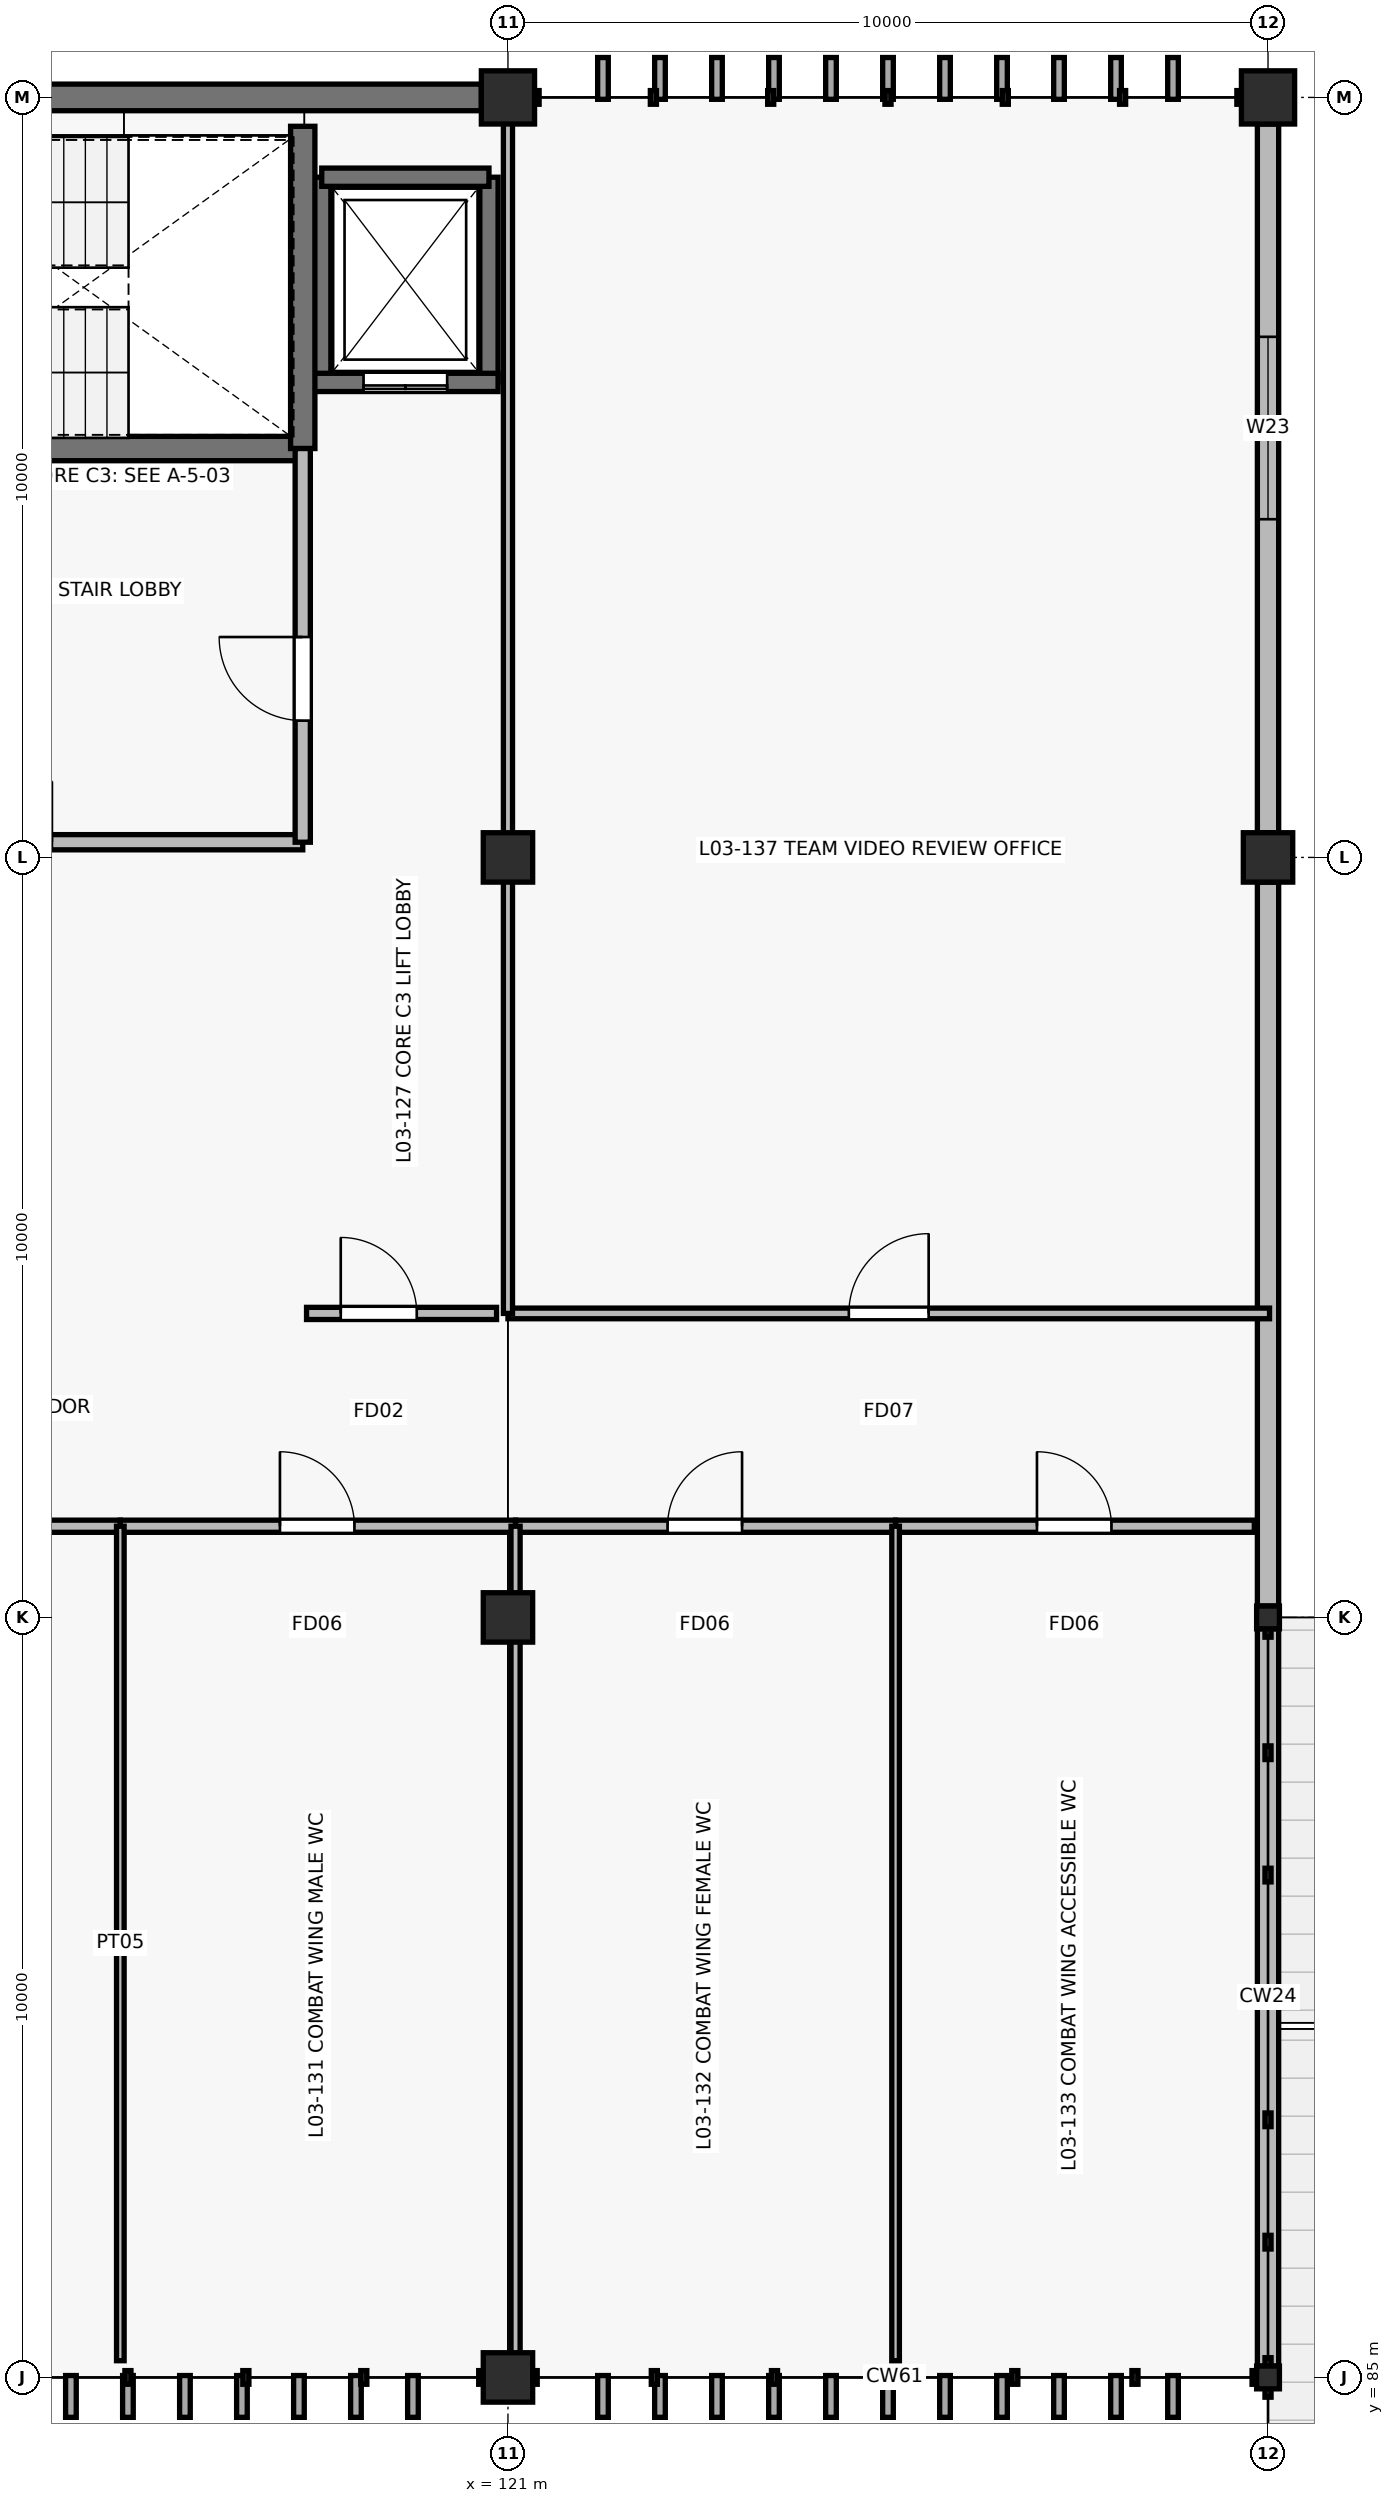
"""IFC4 building model, lengths in metres.
Left out: names, types, materials, properties, quantities, classifications, styles, units other than length and angle.
Written with IfcOpenShell. Run it as: python <this file> out.ifc"""

import sys

from ifc_helpers import new_model, si_unit, direction, frame, frame_2d, origin, origin_2d, place, context, subcontext, project, spatial, rectangle, circle, i_section, extrude, element, fill, save


model = new_model("IFC4")
c1 = context("Model", 3, precision=1e-05, world=origin(), true_north=direction((0.0, 1.0)))
c2 = subcontext(c1, "Body", "Model", "MODEL_VIEW")
j1 = project(units=[si_unit("LENGTHUNIT", "METRE"), si_unit("PLANEANGLEUNIT", "RADIAN")], contexts=[c1])
p1 = place(None, origin())
s1 = spatial("IfcSite", under=j1, at=p1, CompositionType="ELEMENT")
p2 = place(p1, origin())
s2 = spatial("IfcBuilding", under=s1, at=p2, CompositionType="ELEMENT")
p3 = place(p2, frame((0.0, 0.0, 13.2)))
s3 = spatial("IfcBuildingStorey", under=s2, at=p3, CompositionType="ELEMENT", Elevation=13.2)
for number, where, z_axis, x_axis in (
    (1, (131.0, 85.0, 0.0), (0.0, 0.0, 1.0), (1.0, 0.0, 0.0)),
    (2, (131.0, 95.0, 0.0), (0.0, 0.0, 1.0), (1.0, 0.0, 0.0)),
):
    element("IfcColumn", number, at=place(p3, frame(where, z_axis=z_axis, x_axis=x_axis)), inside=s3, PredefinedType="COLUMN", context=c2, shape_type="SweptSolid", body=[
        extrude(i_section(OverallWidth=0.3, OverallDepth=0.3, WebThickness=0.011, FlangeThickness=0.019, at=origin_2d()), origin(), (0.0, 0.0, 1.0), 4.2),
    ])
for number, where, z_axis, x_axis in (
    (3, (121.0, 85.0, 0.0), (0.0, 0.0, 1.0), (1.0, 0.0, 0.0)),
    (4, (121.0, 95.0, 0.0), (0.0, 0.0, 1.0), (1.0, 0.0, 0.0)),
    (5, (121.0, 105.0, 0.0), (0.0, 0.0, 1.0), (1.0, 0.0, 0.0)),
):
    element("IfcColumn", number, at=place(p3, frame(where, z_axis=z_axis, x_axis=x_axis)), inside=s3, PredefinedType="COLUMN", context=c2, shape_type="SweptSolid", body=[
        extrude(rectangle(XDim=0.65, YDim=0.65, at=origin_2d()), origin(), (0.0, 0.0, 1.0), 4.2),
    ])
p4 = place(p3, frame((121.0, 115.0, 0.0), z_axis=(0.0, 0.0, 1.0), x_axis=(1.0, 0.0, 0.0)))
e6 = element("IfcColumn", 6, at=p4, inside=s3, PredefinedType="COLUMN", context=c2, shape_type="SweptSolid", body=[
    extrude(circle(Radius=0.35, at=origin_2d()), origin(), (0.0, 0.0, 1.0), 4.2),
])
p5 = place(p3, frame((131.0, 105.0, 0.0), z_axis=(0.0, 0.0, 1.0), x_axis=(1.0, 0.0, 0.0)))
e7 = element("IfcColumn", 7, at=p5, inside=s3, PredefinedType="COLUMN", context=c2, shape_type="SweptSolid", body=[
    extrude(rectangle(XDim=0.65, YDim=0.65, at=origin_2d()), origin(), (0.0, 0.0, 1.0), 4.2),
])
p6 = place(p3, frame((131.0, 115.0, 0.0), z_axis=(0.0, 0.0, 1.0), x_axis=(1.0, 0.0, 0.0)))
e8 = element("IfcColumn", 8, at=p6, inside=s3, PredefinedType="COLUMN", context=c2, shape_type="SweptSolid", body=[
    extrude(circle(Radius=0.35, at=origin_2d()), origin(), (0.0, 0.0, 1.0), 4.2),
])
p7 = place(p3, frame((111.35, 115.0, 0.0), z_axis=(0.0, 0.0, 1.0), x_axis=(1.0, 0.0, 0.0)))
e9 = element("IfcWall", 9, at=p7, inside=s3, PredefinedType="SOLIDWALL", context=c2, shape_type="SweptSolid", body=[
    extrude(rectangle(XDim=9.3, YDim=0.35, at=frame_2d((4.65, 0.0))), origin(), (0.0, 0.0, 1.0), 4.2),
])
p8 = place(p7, frame((2.2, 0.0, 1.0)))
e10 = element("IfcOpeningElement", 10, at=p8, cuts=e9, PredefinedType="OPENING", context=c2, shape_type="SweptSolid", body=[
    extrude(rectangle(XDim=1.2, YDim=1.8, at=frame_2d((0.6, 0.9))), frame((0.0, 0.185, 0.0), z_axis=(0.0, -1.0, 0.0), x_axis=(1.0, 0.0, 0.0)), (0.0, 0.0, 1.0), 0.37),
])
p9 = place(p3, frame((131.0, 94.85, 0.0), z_axis=(0.0, 0.0, 1.0), x_axis=(0.0, -1.0, 0.0)))
e11 = element("IfcWall", 11, at=p9, inside=s3, PredefinedType="SOLIDWALL", context=c2, shape_type="SweptSolid", body=[
    extrude(rectangle(XDim=9.7, YDim=0.28, at=frame_2d((4.85, 0.0))), origin(), (0.0, 0.0, 1.0), 0.475),
])
p10 = place(p3, frame((131.0, 104.675, 0.0), z_axis=(0.0, 0.0, 1.0), x_axis=(0.0, -1.0, 0.0)))
e12 = element("IfcWall", 12, at=p10, inside=s3, PredefinedType="SOLIDWALL", context=c2, shape_type="SweptSolid", body=[
    extrude(rectangle(XDim=9.525, YDim=0.28, at=frame_2d((4.763, 0.0))), origin(), (0.0, 0.0, 1.0), 0.475),
])
p11 = place(p3, frame((131.0, 114.65, 0.0), z_axis=(0.0, 0.0, 1.0), x_axis=(0.0, -1.0, 0.0)))
e13 = element("IfcWall", 13, at=p11, inside=s3, PredefinedType="SOLIDWALL", context=c2, shape_type="SweptSolid", body=[
    extrude(rectangle(XDim=9.325, YDim=0.28, at=frame_2d((4.663, 0.0))), origin(), (0.0, 0.0, 1.0), 3.005),
])
p12 = place(p11, frame((2.8, 0.0, 0.9)))
e14 = element("IfcOpeningElement", 14, at=p12, cuts=e13, PredefinedType="OPENING", context=c2, shape_type="SweptSolid", body=[
    extrude(rectangle(XDim=2.4, YDim=1.1, at=frame_2d((1.2, 0.55))), frame((0.0, 0.15, 0.0), z_axis=(0.0, -1.0, 0.0), x_axis=(1.0, 0.0, 0.0)), (0.0, 0.0, 1.0), 0.3),
])
for number, where, z_axis, x_axis in (
    (15, (118.55, 111.25, 0.0), (0.0, 0.0, 1.0), (0.0, 1.0, 0.0)),
    (16, (120.75, 113.95, 0.0), (0.0, 0.0, 1.0), (0.0, -1.0, 0.0)),
):
    element("IfcWall", number, at=place(p3, frame(where, z_axis=z_axis, x_axis=x_axis)), inside=s3, PredefinedType="SHEAR", context=c2, shape_type="SweptSolid", body=[
        extrude(rectangle(XDim=2.7, YDim=0.24, at=frame_2d((1.35, 0.0))), origin(), (0.0, 0.0, 1.0), 4.2),
    ])
p13 = place(p3, frame((118.55, 113.95, 0.0), z_axis=(0.0, 0.0, 1.0), x_axis=(1.0, 0.0, 0.0)))
e17 = element("IfcWall", 17, at=p13, inside=s3, PredefinedType="SHEAR", context=c2, shape_type="SweptSolid", body=[
    extrude(rectangle(XDim=2.2, YDim=0.24, at=frame_2d((1.1, 0.0))), origin(), (0.0, 0.0, 1.0), 4.2),
])
p14 = place(p3, frame((120.87, 111.25, 0.0), z_axis=(0.0, 0.0, 1.0), x_axis=(-1.0, 0.0, 0.0)))
e18 = element("IfcWall", 18, at=p14, inside=s3, PredefinedType="SHEAR", context=c2, shape_type="SweptSolid", body=[
    extrude(rectangle(XDim=2.44, YDim=0.24, at=frame_2d((1.22, 0.0))), origin(), (0.0, 0.0, 1.0), 4.2),
])
p15 = place(p14, frame((0.67, 0.0, 0.0)))
e19 = element("IfcOpeningElement", 19, at=p15, cuts=e18, PredefinedType="OPENING", context=c2, shape_type="SweptSolid", body=[
    extrude(rectangle(XDim=1.1, YDim=2.15, at=frame_2d((0.55, 1.075))), frame((0.0, 0.13, 0.0), z_axis=(0.0, -1.0, 0.0), x_axis=(1.0, 0.0, 0.0)), (0.0, 0.0, 1.0), 0.26),
])
p16 = place(p3, frame((111.2, 110.38, 0.0), z_axis=(0.0, 0.0, 1.0), x_axis=(1.0, 0.0, 0.0)))
e20 = element("IfcWall", 20, at=p16, inside=s3, PredefinedType="SHEAR", context=c2, shape_type="SweptSolid", body=[
    extrude(rectangle(XDim=7.1, YDim=0.32, at=frame_2d((3.55, 0.0))), origin(), (0.0, 0.0, 1.0), 4.2),
])
p17 = place(p16, frame((0.3, 0.0, 0.0)))
e21 = element("IfcOpeningElement", 21, at=p17, cuts=e20, PredefinedType="OPENING", context=c2, shape_type="SweptSolid", body=[
    extrude(rectangle(XDim=1.0, YDim=2.15, at=frame_2d((0.5, 1.075))), frame((0.0, 0.17, 0.0), z_axis=(0.0, -1.0, 0.0), x_axis=(1.0, 0.0, 0.0)), (0.0, 0.0, 1.0), 0.34),
])
p18 = place(p3, frame((118.3, 110.38, 0.0), z_axis=(0.0, 0.0, 1.0), x_axis=(0.0, 1.0, 0.0)))
e22 = element("IfcWall", 22, at=p18, inside=s3, PredefinedType="SHEAR", context=c2, shape_type="SweptSolid", body=[
    extrude(rectangle(XDim=4.24, YDim=0.32, at=frame_2d((2.12, 0.0))), origin(), (0.0, 0.0, 1.0), 4.2),
])
p19 = place(p3, frame((111.2, 105.2, 0.0), z_axis=(0.0, 0.0, 1.0), x_axis=(1.0, 0.0, 0.0)))
e23 = element("IfcWall", 23, at=p19, inside=s3, PredefinedType="PARTITIONING", context=c2, shape_type="SweptSolid", body=[
    extrude(rectangle(XDim=7.1, YDim=0.2, at=frame_2d((3.55, 0.0))), origin(), (0.0, 0.0, 1.0), 3.005),
])
p20 = place(p19, frame((2.2, 0.0, 0.0)))
e24 = element("IfcOpeningElement", 24, at=p20, cuts=e23, PredefinedType="OPENING", context=c2, shape_type="SweptSolid", body=[
    extrude(rectangle(XDim=1.6, YDim=2.2, at=frame_2d((0.8, 1.1))), frame((0.0, 0.11, 0.0), z_axis=(0.0, -1.0, 0.0), x_axis=(1.0, 0.0, 0.0)), (0.0, 0.0, 1.0), 0.22),
])
p21 = place(p3, frame((118.3, 105.2, 0.0), z_axis=(0.0, 0.0, 1.0), x_axis=(0.0, 1.0, 0.0)))
e25 = element("IfcWall", 25, at=p21, inside=s3, PredefinedType="PARTITIONING", context=c2, shape_type="SweptSolid", body=[
    extrude(rectangle(XDim=5.18, YDim=0.2, at=frame_2d((2.59, 0.0))), origin(), (0.0, 0.0, 1.0), 3.005),
])
p22 = place(p21, frame((1.6, 0.0, 0.0)))
e26 = element("IfcOpeningElement", 26, at=p22, cuts=e25, PredefinedType="OPENING", context=c2, shape_type="SweptSolid", body=[
    extrude(rectangle(XDim=1.1, YDim=2.15, at=frame_2d((0.55, 1.075))), frame((0.0, 0.11, 0.0), z_axis=(0.0, -1.0, 0.0), x_axis=(1.0, 0.0, 0.0)), (0.0, 0.0, 1.0), 0.22),
])
p23 = place(p3, frame((118.35, 99.0, 0.0), z_axis=(0.0, 0.0, 1.0), x_axis=(1.0, 0.0, 0.0)))
e27 = element("IfcWall", 27, at=p23, inside=s3, PredefinedType="PARTITIONING", context=c2, shape_type="SweptSolid", body=[
    extrude(rectangle(XDim=2.5, YDim=0.16, at=frame_2d((1.25, 0.0))), origin(), (0.0, 0.0, 1.0), 3.005),
])
p24 = place(p23, frame((0.45, 0.0, 0.0)))
e28 = element("IfcOpeningElement", 28, at=p24, cuts=e27, PredefinedType="OPENING", context=c2, shape_type="SweptSolid", body=[
    extrude(rectangle(XDim=1.0, YDim=2.15, at=frame_2d((0.5, 1.075))), frame((0.0, 0.09, 0.0), z_axis=(0.0, -1.0, 0.0), x_axis=(1.0, 0.0, 0.0)), (0.0, 0.0, 1.0), 0.18),
])
p25 = place(p3, frame((101.1, 96.2, 0.0), z_axis=(0.0, 0.0, 1.0), x_axis=(1.0, 0.0, 0.0)))
e29 = element("IfcWall", 29, at=p25, inside=s3, PredefinedType="PARTITIONING", context=c2, shape_type="SweptSolid", body=[
    extrude(rectangle(XDim=14.8, YDim=0.16, at=frame_2d((7.4, 0.0))), origin(), (0.0, 0.0, 1.0), 3.005),
])
p26 = place(p25, frame((6.25, 0.0, 0.0)))
e30 = element("IfcOpeningElement", 30, at=p26, cuts=e29, PredefinedType="OPENING", context=c2, shape_type="SweptSolid", body=[
    extrude(rectangle(XDim=1.3, YDim=2.2, at=frame_2d((0.65, 1.1))), frame((0.0, 0.09, 0.0), z_axis=(0.0, -1.0, 0.0), x_axis=(1.0, 0.0, 0.0)), (0.0, 0.0, 1.0), 0.18),
])
p27 = place(p3, frame((115.9, 96.2, 0.0), z_axis=(0.0, 0.0, 1.0), x_axis=(1.0, 0.0, 0.0)))
e31 = element("IfcWall", 31, at=p27, inside=s3, PredefinedType="PARTITIONING", context=c2, shape_type="SweptSolid", body=[
    extrude(rectangle(XDim=5.2, YDim=0.16, at=frame_2d((2.6, 0.0))), origin(), (0.0, 0.0, 1.0), 3.005),
])
p28 = place(p27, frame((2.1, 0.0, 0.0)))
e32 = element("IfcOpeningElement", 32, at=p28, cuts=e31, PredefinedType="OPENING", context=c2, shape_type="SweptSolid", body=[
    extrude(rectangle(XDim=0.98, YDim=2.1, at=frame_2d((0.49, 1.05))), frame((0.0, 0.09, 0.0), z_axis=(0.0, -1.0, 0.0), x_axis=(1.0, 0.0, 0.0)), (0.0, 0.0, 1.0), 0.18),
])
p29 = place(p3, frame((115.9, 85.22, 0.0), z_axis=(0.0, 0.0, 1.0), x_axis=(0.0, 1.0, 0.0)))
e33 = element("IfcWall", 33, at=p29, inside=s3, PredefinedType="PARTITIONING", context=c2, shape_type="SweptSolid", body=[
    extrude(rectangle(XDim=10.98, YDim=0.1, at=frame_2d((5.49, 0.0))), origin(), (0.0, 0.0, 1.0), 3.005),
])
p30 = place(p3, frame((121.1, 96.2, 0.0), z_axis=(0.0, 0.0, 1.0), x_axis=(1.0, 0.0, 0.0)))
e34 = element("IfcWall", 34, at=p30, inside=s3, PredefinedType="PARTITIONING", context=c2, shape_type="SweptSolid", body=[
    extrude(rectangle(XDim=5.0, YDim=0.16, at=frame_2d((2.5, 0.0))), origin(), (0.0, 0.0, 1.0), 3.005),
])
p31 = place(p30, frame((2.0, 0.0, 0.0)))
e35 = element("IfcOpeningElement", 35, at=p31, cuts=e34, PredefinedType="OPENING", context=c2, shape_type="SweptSolid", body=[
    extrude(rectangle(XDim=0.98, YDim=2.1, at=frame_2d((0.49, 1.05))), frame((0.0, 0.09, 0.0), z_axis=(0.0, -1.0, 0.0), x_axis=(1.0, 0.0, 0.0)), (0.0, 0.0, 1.0), 0.18),
])
p32 = place(p3, frame((121.1, 85.22, 0.0), z_axis=(0.0, 0.0, 1.0), x_axis=(0.0, 1.0, 0.0)))
e36 = element("IfcWall", 36, at=p32, inside=s3, PredefinedType="PARTITIONING", context=c2, shape_type="SweptSolid", body=[
    extrude(rectangle(XDim=10.98, YDim=0.12, at=frame_2d((5.49, 0.0))), origin(), (0.0, 0.0, 1.0), 3.005),
])
p33 = place(p3, frame((126.1, 96.2, 0.0), z_axis=(0.0, 0.0, 1.0), x_axis=(1.0, 0.0, 0.0)))
e37 = element("IfcWall", 37, at=p33, inside=s3, PredefinedType="PARTITIONING", context=c2, shape_type="SweptSolid", body=[
    extrude(rectangle(XDim=4.72, YDim=0.16, at=frame_2d((2.36, 0.0))), origin(), (0.0, 0.0, 1.0), 3.005),
])
p34 = place(p33, frame((1.86, 0.0, 0.0)))
e38 = element("IfcOpeningElement", 38, at=p34, cuts=e37, PredefinedType="OPENING", context=c2, shape_type="SweptSolid", body=[
    extrude(rectangle(XDim=0.98, YDim=2.1, at=frame_2d((0.49, 1.05))), frame((0.0, 0.09, 0.0), z_axis=(0.0, -1.0, 0.0), x_axis=(1.0, 0.0, 0.0)), (0.0, 0.0, 1.0), 0.18),
])
p35 = place(p3, frame((126.1, 85.22, 0.0), z_axis=(0.0, 0.0, 1.0), x_axis=(0.0, 1.0, 0.0)))
e39 = element("IfcWall", 39, at=p35, inside=s3, PredefinedType="PARTITIONING", context=c2, shape_type="SweptSolid", body=[
    extrude(rectangle(XDim=10.98, YDim=0.1, at=frame_2d((5.49, 0.0))), origin(), (0.0, 0.0, 1.0), 3.005),
])
p36 = place(p3, frame((121.0, 99.0, 0.0), z_axis=(0.0, 0.0, 1.0), x_axis=(1.0, 0.0, 0.0)))
e40 = element("IfcWall", 40, at=p36, inside=s3, PredefinedType="PARTITIONING", context=c2, shape_type="SweptSolid", body=[
    extrude(rectangle(XDim=10.02, YDim=0.14, at=frame_2d((5.01, 0.0))), origin(), (0.0, 0.0, 1.0), 3.005),
])
p37 = place(p36, frame((4.485, 0.0, 0.0)))
e41 = element("IfcOpeningElement", 41, at=p37, cuts=e40, PredefinedType="OPENING", context=c2, shape_type="SweptSolid", body=[
    extrude(rectangle(XDim=1.05, YDim=2.1, at=frame_2d((0.525, 1.05))), frame((0.0, 0.08, 0.0), z_axis=(0.0, -1.0, 0.0), x_axis=(1.0, 0.0, 0.0)), (0.0, 0.0, 1.0), 0.16),
])
p38 = place(p3, frame((121.0, 99.0, 0.0), z_axis=(0.0, 0.0, 1.0), x_axis=(0.0, 1.0, 0.0)))
e42 = element("IfcWall", 42, at=p38, inside=s3, PredefinedType="PARTITIONING", context=c2, shape_type="SweptSolid", body=[
    extrude(rectangle(XDim=15.75, YDim=0.12, at=frame_2d((7.875, 0.0))), origin(), (0.0, 0.0, 1.0), 3.005),
])
p39 = place(p12, origin())
e43 = element("IfcWindow", 43, at=p39, inside=s3, PartitioningType="DOUBLE_PANEL_VERTICAL", PredefinedType="WINDOW", context=c2, shape_type="SweptSolid", body=[
    extrude(rectangle(XDim=2.4, YDim=1.1, at=frame_2d((1.2, 0.55))), frame((0.0, 0.03, 0.0), z_axis=(0.0, -1.0, 0.0), x_axis=(1.0, 0.0, 0.0)), (0.0, 0.0, 1.0), 0.06),
])
fill(e14, e43)
p40 = place(p15, origin())
e44 = element("IfcDoor", 44, at=p40, inside=s3, OperationType="DOUBLE_DOOR_SLIDING", PredefinedType="USERDEFINED", context=c2, shape_type="SweptSolid", body=[
    extrude(rectangle(XDim=1.1, YDim=2.15, at=frame_2d((0.55, 1.075))), frame((0.0, 0.025, 0.0), z_axis=(0.0, -1.0, 0.0), x_axis=(1.0, 0.0, 0.0)), (0.0, 0.0, 1.0), 0.05),
])
fill(e19, e44)
p41 = place(p22, origin())
e45 = element("IfcDoor", 45, at=p41, inside=s3, OperationType="SINGLE_SWING_RIGHT", PredefinedType="DOOR", context=c2, shape_type="SweptSolid", body=[
    extrude(rectangle(XDim=1.1, YDim=2.15, at=frame_2d((0.55, 1.075))), frame((0.0, 0.025, 0.0), z_axis=(0.0, -1.0, 0.0), x_axis=(1.0, 0.0, 0.0)), (0.0, 0.0, 1.0), 0.05),
])
fill(e26, e45)
p42 = place(p24, origin())
e46 = element("IfcDoor", 46, at=p42, inside=s3, OperationType="SINGLE_SWING_LEFT", PredefinedType="DOOR", context=c2, shape_type="SweptSolid", body=[
    extrude(rectangle(XDim=1.0, YDim=2.15, at=frame_2d((0.5, 1.075))), frame((0.0, 0.025, 0.0), z_axis=(0.0, -1.0, 0.0), x_axis=(1.0, 0.0, 0.0)), (0.0, 0.0, 1.0), 0.05),
])
fill(e28, e46)
p43 = place(p28, origin())
e47 = element("IfcDoor", 47, at=p43, inside=s3, OperationType="SINGLE_SWING_LEFT", PredefinedType="DOOR", context=c2, shape_type="SweptSolid", body=[
    extrude(rectangle(XDim=0.98, YDim=2.1, at=frame_2d((0.49, 1.05))), frame((0.0, 0.025, 0.0), z_axis=(0.0, -1.0, 0.0), x_axis=(1.0, 0.0, 0.0)), (0.0, 0.0, 1.0), 0.05),
])
fill(e32, e47)
p44 = place(p31, origin())
e48 = element("IfcDoor", 48, at=p44, inside=s3, OperationType="SINGLE_SWING_RIGHT", PredefinedType="DOOR", context=c2, shape_type="SweptSolid", body=[
    extrude(rectangle(XDim=0.98, YDim=2.1, at=frame_2d((0.49, 1.05))), frame((0.0, 0.025, 0.0), z_axis=(0.0, -1.0, 0.0), x_axis=(1.0, 0.0, 0.0)), (0.0, 0.0, 1.0), 0.05),
])
fill(e35, e48)
p45 = place(p34, origin())
e49 = element("IfcDoor", 49, at=p45, inside=s3, OperationType="SINGLE_SWING_LEFT", PredefinedType="DOOR", context=c2, shape_type="SweptSolid", body=[
    extrude(rectangle(XDim=0.98, YDim=2.1, at=frame_2d((0.49, 1.05))), frame((0.0, 0.025, 0.0), z_axis=(0.0, -1.0, 0.0), x_axis=(1.0, 0.0, 0.0)), (0.0, 0.0, 1.0), 0.05),
])
fill(e38, e49)
p46 = place(p37, origin())
e50 = element("IfcDoor", 50, at=p46, inside=s3, OperationType="SINGLE_SWING_RIGHT", PredefinedType="DOOR", context=c2, shape_type="SweptSolid", body=[
    extrude(rectangle(XDim=1.05, YDim=2.1, at=frame_2d((0.525, 1.05))), frame((0.0, 0.025, 0.0), z_axis=(0.0, -1.0, 0.0), x_axis=(1.0, 0.0, 0.0)), (0.0, 0.0, 1.0), 0.05),
])
fill(e41, e50)
save(model, sys.argv[1])
